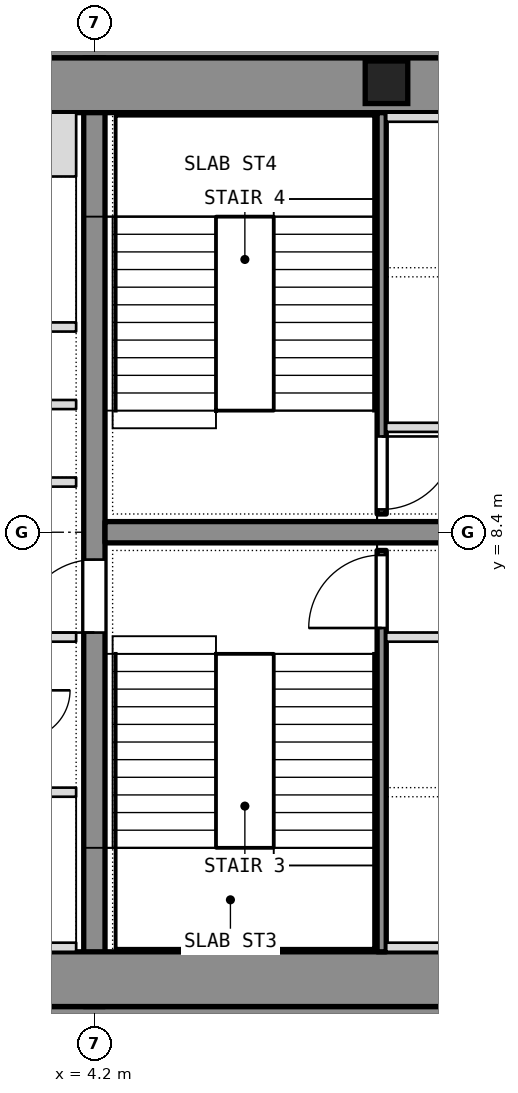
"""IFC4 building model, lengths in metres.
Left out: names, types, materials, properties, quantities, classifications, styles, units other than length and angle.
Written with IfcOpenShell. Run it as: python <this file> out.ifc"""

import sys

from ifc_helpers import new_model, si_unit, direction, frame, frame_2d, origin, origin_2d, place, context, subcontext, project, spatial, rectangle, extrude, element, fill, save


model = new_model("IFC4")
c1 = context("Model", 3, precision=1e-05, world=origin(), true_north=direction((0.0, 1.0)))
c2 = subcontext(c1, "Body", "Model", "MODEL_VIEW")
j1 = project(units=[si_unit("LENGTHUNIT", "METRE"), si_unit("PLANEANGLEUNIT", "RADIAN")], contexts=[c1])
p1 = place(None, origin())
s1 = spatial("IfcSite", under=j1, at=p1, CompositionType="ELEMENT")
p2 = place(p1, origin())
s2 = spatial("IfcBuilding", under=s1, at=p2, CompositionType="ELEMENT")
p3 = place(p2, frame((0.0, 0.0, 274.1)))
s3 = spatial("IfcBuildingStorey", under=s2, at=p3, CompositionType="ELEMENT", Elevation=274.1)
for number, where, z_axis, x_axis in (
    (1, (-11.1, 0.3, 0.0), (0.0, 0.0, 1.0), (1.0, 0.0, 0.0)),
    (2, (-11.1, 16.5, 0.0), (0.0, 0.0, 1.0), (1.0, 0.0, 0.0)),
):
    element("IfcWall", number, at=place(p3, frame(where, z_axis=z_axis, x_axis=x_axis)), inside=s3, PredefinedType="SHEAR", context=c2, shape_type="SweptSolid", body=[
        extrude(rectangle(XDim=22.2, YDim=0.6, at=frame_2d((11.1, 0.0))), origin(), (0.0, 0.0, 1.0), 3.6),
    ])
p4 = place(p3, frame((4.2, 0.6, 0.0), z_axis=(0.0, 0.0, 1.0), x_axis=(0.0, 1.0, 0.0)))
e3 = element("IfcWall", 3, at=p4, inside=s3, PredefinedType="SHEAR", context=c2, shape_type="SweptSolid", body=[
    extrude(rectangle(XDim=15.6, YDim=0.35, at=frame_2d((7.8, 0.0))), origin(), (0.0, 0.0, 1.0), 3.6),
])
p5 = place(p4, frame((6.15, 0.0, 0.0)))
e4 = element("IfcOpeningElement", 4, at=p5, cuts=e3, PredefinedType="OPENING", context=c2, shape_type="SweptSolid", body=[
    extrude(rectangle(XDim=1.2, YDim=2.1, at=frame_2d((0.6, 1.05))), frame((0.0, 0.175, 0.0), z_axis=(0.0, -1.0, 0.0), x_axis=(1.0, 0.0, 0.0)), (0.0, 0.0, 1.0), 0.35),
])
p6 = place(p3, frame((4.375, 8.4, 0.0), z_axis=(0.0, 0.0, 1.0), x_axis=(1.0, 0.0, 0.0)))
e5 = element("IfcWall", 5, at=p6, inside=s3, PredefinedType="SHEAR", context=c2, shape_type="SweptSolid", body=[
    extrude(rectangle(XDim=6.725, YDim=0.35, at=frame_2d((3.363, 0.0))), origin(), (0.0, 0.0, 1.0), 3.6),
])
p7 = place(p3, frame((9.004, 15.8, 0.0), z_axis=(0.0, 0.0, 1.0), x_axis=(1.0, 0.0, 0.0)))
e6 = element("IfcColumn", 6, at=p7, inside=s3, PredefinedType="COLUMN", context=c2, shape_type="SweptSolid", body=[
    extrude(rectangle(XDim=0.7, YDim=0.7, at=origin_2d()), origin(), (0.0, 0.0, 1.0), 3.6),
])
for number, where, z_axis, x_axis in (
    (7, (-11.1, 1.05, 0.0), (0.0, 0.0, 1.0), (1.0, 0.0, 0.0)),
    (8, (-11.1, 15.75, 0.0), (0.0, 0.0, 1.0), (1.0, 0.0, 0.0)),
):
    element("IfcWall", number, at=place(p3, frame(where, z_axis=z_axis, x_axis=x_axis)), inside=s3, PredefinedType="PARTITIONING", context=c2, shape_type="SweptSolid", body=[
        extrude(rectangle(XDim=22.2, YDim=0.9, at=frame_2d((11.1, 0.0))), origin(), (0.0, 0.0, 1.0), 3.34),
    ])
p8 = place(p3, frame((8.925, 1.5, 0.0), z_axis=(0.0, 0.0, 1.0), x_axis=(0.0, 1.0, 0.0)))
e9 = element("IfcWall", 9, at=p8, inside=s3, PredefinedType="SHEAR", context=c2, shape_type="SweptSolid", body=[
    extrude(rectangle(XDim=6.6, YDim=0.15, at=frame_2d((3.3, 0.0))), origin(), (0.0, 0.0, 1.0), 3.34),
])
p9 = place(p8, frame((5.325, 0.0, 0.0)))
e10 = element("IfcOpeningElement", 10, at=p9, cuts=e9, PredefinedType="OPENING", context=c2, shape_type="SweptSolid", body=[
    extrude(rectangle(XDim=1.2, YDim=2.1, at=frame_2d((0.6, 1.05))), frame((0.0, 0.075, 0.0), z_axis=(0.0, -1.0, 0.0), x_axis=(1.0, 0.0, 0.0)), (0.0, 0.0, 1.0), 0.15),
])
for number, where, z_axis, x_axis in (
    (11, (9.0, 6.675, 0.0), (0.0, 0.0, 1.0), (1.0, 0.0, 0.0)),
    (12, (9.0, 1.575, 0.0), (0.0, 0.0, 1.0), (1.0, 0.0, 0.0)),
):
    element("IfcWall", number, at=place(p3, frame(where, z_axis=z_axis, x_axis=x_axis)), inside=s3, PredefinedType="SHEAR", context=c2, shape_type="SweptSolid", body=[
        extrude(rectangle(XDim=2.1, YDim=0.15, at=frame_2d((1.05, 0.0))), origin(), (0.0, 0.0, 1.0), 3.6),
    ])
p10 = place(p3, frame((8.925, 8.7, 0.0), z_axis=(0.0, 0.0, 1.0), x_axis=(0.0, 1.0, 0.0)))
e13 = element("IfcWall", 13, at=p10, inside=s3, PredefinedType="SHEAR", context=c2, shape_type="SweptSolid", body=[
    extrude(rectangle(XDim=6.6, YDim=0.15, at=frame_2d((3.3, 0.0))), origin(), (0.0, 0.0, 1.0), 3.34),
])
p11 = place(p10, frame((0.075, 0.0, 0.0)))
e14 = element("IfcOpeningElement", 14, at=p11, cuts=e13, PredefinedType="OPENING", context=c2, shape_type="SweptSolid", body=[
    extrude(rectangle(XDim=1.2, YDim=2.1, at=frame_2d((0.6, 1.05))), frame((0.0, 0.075, 0.0), z_axis=(0.0, -1.0, 0.0), x_axis=(1.0, 0.0, 0.0)), (0.0, 0.0, 1.0), 0.15),
])
for number, where, z_axis, x_axis in (
    (15, (9.0, 10.125, 0.0), (0.0, 0.0, 1.0), (1.0, 0.0, 0.0)),
    (16, (9.0, 15.225, 0.0), (0.0, 0.0, 1.0), (1.0, 0.0, 0.0)),
):
    element("IfcWall", number, at=place(p3, frame(where, z_axis=z_axis, x_axis=x_axis)), inside=s3, PredefinedType="SHEAR", context=c2, shape_type="SweptSolid", body=[
        extrude(rectangle(XDim=2.1, YDim=0.15, at=frame_2d((1.05, 0.0))), origin(), (0.0, 0.0, 1.0), 3.6),
    ])
p12 = place(p3, frame((-3.9, 4.125, 0.0), z_axis=(0.0, 0.0, 1.0), x_axis=(1.0, 0.0, 0.0)))
e17 = element("IfcWall", 17, at=p12, inside=s3, PredefinedType="PARTITIONING", context=c2, shape_type="SweptSolid", body=[
    extrude(rectangle(XDim=7.8, YDim=0.15, at=frame_2d((3.9, 0.0))), origin(), (0.0, 0.0, 1.0), 3.34),
])
p13 = place(p12, frame((3.75, 0.0, 0.0)))
e18 = element("IfcOpeningElement", 18, at=p13, cuts=e17, PredefinedType="OPENING", context=c2, shape_type="SweptSolid", body=[
    extrude(rectangle(XDim=1.2, YDim=2.1, at=frame_2d((0.6, 1.05))), frame((0.0, 0.075, 0.0), z_axis=(0.0, -1.0, 0.0), x_axis=(1.0, 0.0, 0.0)), (0.0, 0.0, 1.0), 0.15),
])
p14 = place(p3, frame((-3.9, 11.775, 0.0), z_axis=(0.0, 0.0, 1.0), x_axis=(1.0, 0.0, 0.0)))
e19 = element("IfcWall", 19, at=p14, inside=s3, PredefinedType="PARTITIONING", context=c2, shape_type="SweptSolid", body=[
    extrude(rectangle(XDim=7.8, YDim=0.15, at=frame_2d((3.9, 0.0))), origin(), (0.0, 0.0, 1.0), 3.34),
])
p15 = place(p14, frame((3.3, 0.0, 0.0)))
e20 = element("IfcOpeningElement", 20, at=p15, cuts=e19, PredefinedType="OPENING", context=c2, shape_type="SweptSolid", body=[
    extrude(rectangle(XDim=1.2, YDim=2.1, at=frame_2d((0.6, 1.05))), frame((0.0, 0.075, 0.0), z_axis=(0.0, -1.0, 0.0), x_axis=(1.0, 0.0, 0.0)), (0.0, 0.0, 1.0), 0.15),
])
p16 = place(p3, frame((1.65, 1.575, 0.0), z_axis=(0.0, 0.0, 1.0), x_axis=(1.0, 0.0, 0.0)))
e21 = element("IfcWall", 21, at=p16, inside=s3, PredefinedType="SHEAR", context=c2, shape_type="SweptSolid", body=[
    extrude(rectangle(XDim=2.25, YDim=0.15, at=frame_2d((1.125, 0.0))), origin(), (0.0, 0.0, 1.0), 3.6),
])
p17 = place(p3, frame((1.65, 14.775, 0.0), z_axis=(0.0, 0.0, 1.0), x_axis=(1.0, 0.0, 0.0)))
e22 = element("IfcWall", 22, at=p17, inside=s3, PredefinedType="SHEAR", context=c2, shape_type="SweptSolid", body=[
    extrude(rectangle(XDim=2.25, YDim=1.05, at=frame_2d((1.125, 0.0))), origin(), (0.0, 0.0, 1.0), 3.6),
])
for number, where, z_axis, x_axis in (
    (23, (1.65, 6.675, 0.0), (0.0, 0.0, 1.0), (1.0, 0.0, 0.0)),
    (24, (1.65, 9.225, 0.0), (0.0, 0.0, 1.0), (1.0, 0.0, 0.0)),
):
    element("IfcWall", number, at=place(p3, frame(where, z_axis=z_axis, x_axis=x_axis)), inside=s3, PredefinedType="PARTITIONING", context=c2, shape_type="SweptSolid", body=[
        extrude(rectangle(XDim=2.25, YDim=0.15, at=frame_2d((1.125, 0.0))), origin(), (0.0, 0.0, 1.0), 3.34),
    ])
p18 = place(p3, frame((1.8, 10.5, 0.0), z_axis=(0.0, 0.0, 1.0), x_axis=(1.0, 0.0, 0.0)))
e25 = element("IfcWall", 25, at=p18, inside=s3, PredefinedType="PARTITIONING", context=c2, shape_type="SweptSolid", body=[
    extrude(rectangle(XDim=2.1, YDim=0.15, at=frame_2d((1.05, 0.0))), origin(), (0.0, 0.0, 1.0), 3.34),
])
p19 = place(p9, origin())
e26 = element("IfcDoor", 26, at=p19, inside=s3, OperationType="SINGLE_SWING_LEFT", PredefinedType="DOOR", context=c2, shape_type="SweptSolid", body=[
    extrude(rectangle(XDim=1.2, YDim=2.1, at=frame_2d((0.6, 1.05))), frame((0.0, 0.025, 0.0), z_axis=(0.0, -1.0, 0.0), x_axis=(1.0, 0.0, 0.0)), (0.0, 0.0, 1.0), 0.05),
])
fill(e10, e26)
p20 = place(p11, origin())
e27 = element("IfcDoor", 27, at=p20, inside=s3, OperationType="SINGLE_SWING_LEFT", PredefinedType="DOOR", context=c2, shape_type="SweptSolid", body=[
    extrude(rectangle(XDim=1.2, YDim=2.1, at=frame_2d((0.6, 1.05))), frame((0.0, 0.025, 0.0), z_axis=(0.0, -1.0, 0.0), x_axis=(1.0, 0.0, 0.0)), (0.0, 0.0, 1.0), 0.05),
])
fill(e14, e27)
p21 = place(p5, origin())
e28 = element("IfcDoor", 28, at=p21, inside=s3, OperationType="SINGLE_SWING_LEFT", PredefinedType="DOOR", context=c2, shape_type="SweptSolid", body=[
    extrude(rectangle(XDim=1.2, YDim=2.1, at=frame_2d((0.6, 1.05))), frame((0.0, 0.025, 0.0), z_axis=(0.0, -1.0, 0.0), x_axis=(1.0, 0.0, 0.0)), (0.0, 0.0, 1.0), 0.05),
])
fill(e4, e28)
save(model, sys.argv[1])
